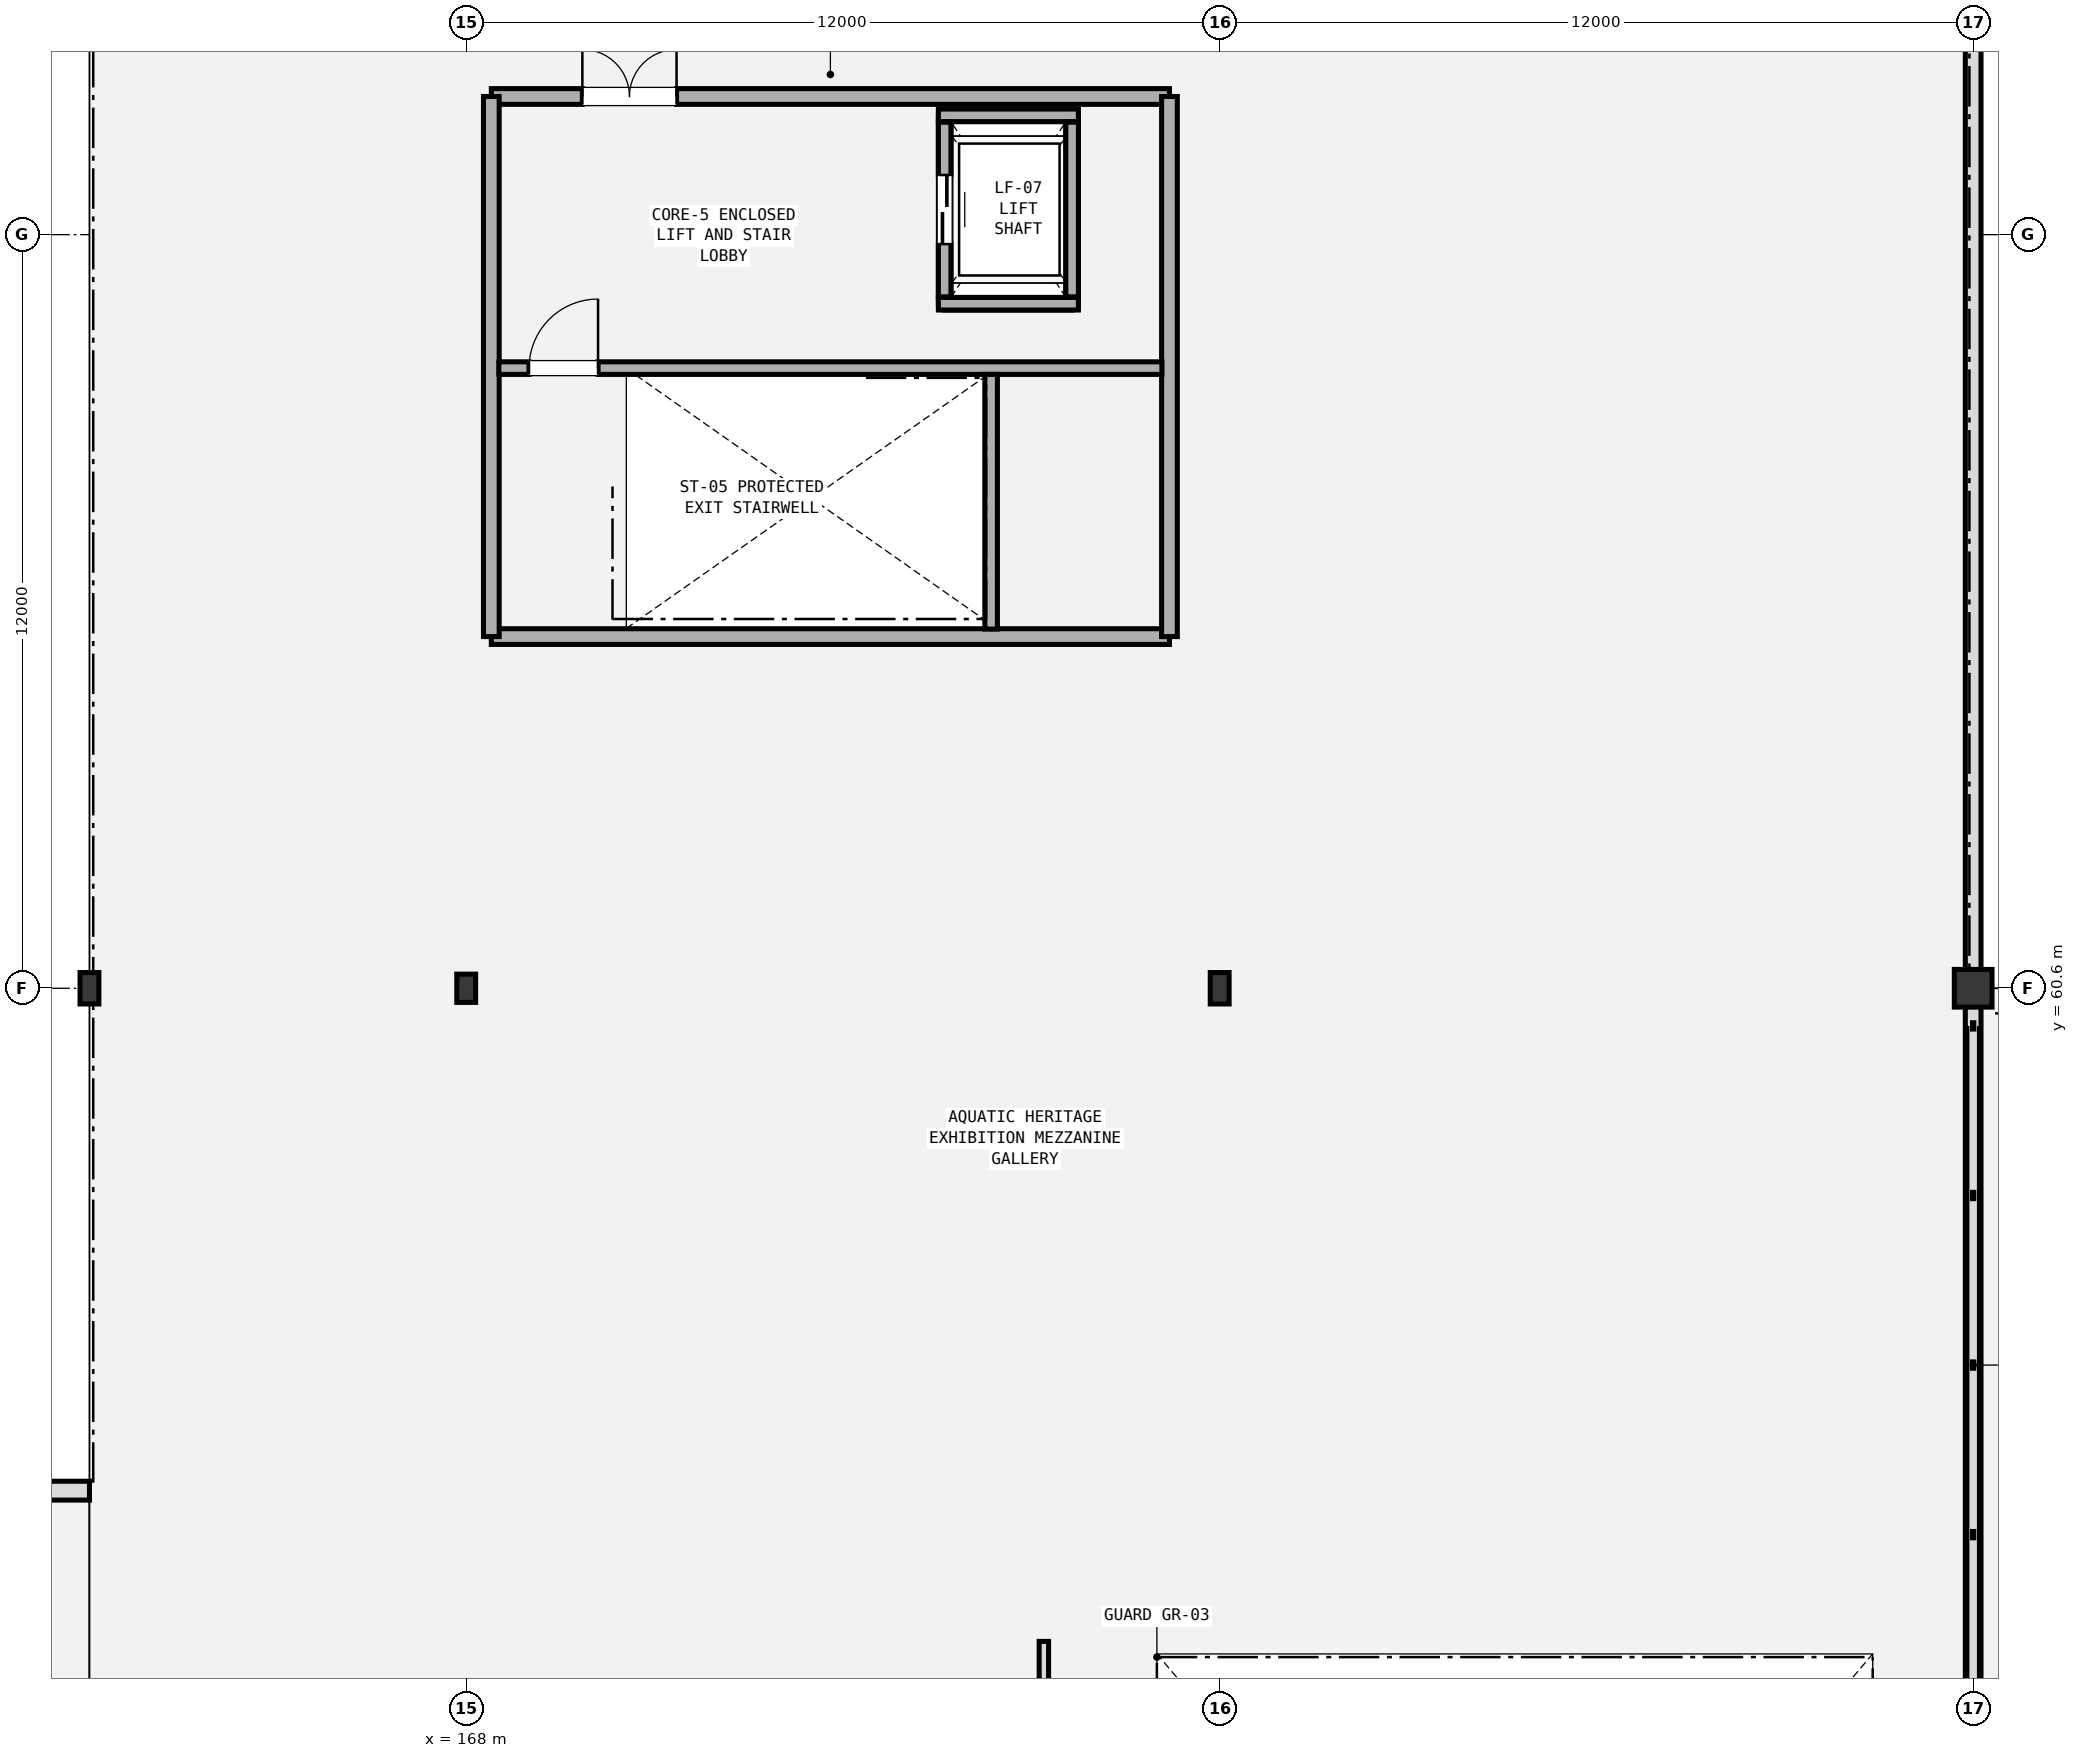
"""IFC4 building model, lengths in metres.
Left out: names, types, materials, properties, quantities, classifications, styles, units other than length and angle.
Written with IfcOpenShell. Run it as: python <this file> out.ifc"""

import sys

from ifc_helpers import new_model, si_unit, direction, frame, frame_2d, origin, origin_2d, place, context, subcontext, project, spatial, rectangle, i_section, extrude, element, fill, save


model = new_model("IFC4")
c1 = context("Model", 3, precision=1e-05, world=origin(), true_north=direction((0.0, 1.0)))
c2 = subcontext(c1, "Body", "Model", "MODEL_VIEW")
j1 = project(units=[si_unit("LENGTHUNIT", "METRE"), si_unit("PLANEANGLEUNIT", "RADIAN")], contexts=[c1])
p1 = place(None, origin())
s1 = spatial("IfcSite", under=j1, at=p1, CompositionType="ELEMENT")
p2 = place(p1, origin())
s2 = spatial("IfcBuilding", under=s1, at=p2, CompositionType="ELEMENT")
p3 = place(p2, frame((0.0, 0.0, 5.4)))
s3 = spatial("IfcBuildingStorey", under=s2, at=p3, CompositionType="ELEMENT", Elevation=5.4)
p4 = place(p3, frame((162.0, 60.6, 0.0), z_axis=(0.0, 0.0, 1.0), x_axis=(1.0, 0.0, 0.0)))
e1 = element("IfcColumn", 1, at=p4, inside=s3, PredefinedType="COLUMN", context=c2, shape_type="SweptSolid", body=[
    extrude(i_section(OverallWidth=0.3, OverallDepth=0.5, WebThickness=0.014, FlangeThickness=0.028, FilletRadius=0.027, at=origin_2d()), origin(), (0.0, 0.0, 1.0), 2.76),
])
p5 = place(p3, frame((168.0, 60.6, 0.0), z_axis=(0.0, 0.0, 1.0), x_axis=(1.0, 0.0, 0.0)))
e2 = element("IfcColumn", 2, at=p5, inside=s3, PredefinedType="COLUMN", context=c2, shape_type="SweptSolid", body=[
    extrude(i_section(OverallWidth=0.3, OverallDepth=0.45, WebThickness=0.014, FlangeThickness=0.026, FilletRadius=0.027, at=origin_2d()), origin(), (0.0, 0.0, 1.0), 2.76),
])
p6 = place(p3, frame((180.0, 60.6, 0.0), z_axis=(0.0, 0.0, 1.0), x_axis=(1.0, 0.0, 0.0)))
e3 = element("IfcColumn", 3, at=p6, inside=s3, PredefinedType="COLUMN", context=c2, shape_type="SweptSolid", body=[
    extrude(i_section(OverallWidth=0.3, OverallDepth=0.5, WebThickness=0.014, FlangeThickness=0.028, FilletRadius=0.027, at=origin_2d()), origin(), (0.0, 0.0, 1.0), 2.76),
])
p7 = place(p3, frame((192.0, 60.6, 0.0), z_axis=(0.0, 0.0, 1.0), x_axis=(1.0, 0.0, 0.0)))
e4 = element("IfcColumn", 4, at=p7, inside=s3, PredefinedType="COLUMN", context=c2, shape_type="SweptSolid", body=[
    extrude(rectangle(XDim=0.6, YDim=0.6, at=origin_2d()), origin(), (0.0, 0.0, 1.0), 2.76),
])
p8 = place(p3, frame((96.6, 52.6, 0.0), z_axis=(0.0, 0.0, 1.0), x_axis=(1.0, 0.0, 0.0)))
e5 = element("IfcWall", 5, at=p8, inside=s3, PredefinedType="SOLIDWALL", context=c2, shape_type="SweptSolid", body=[
    extrude(rectangle(XDim=65.4, YDim=0.3, at=frame_2d((32.7, 0.0))), origin(), (0.0, 0.0, 1.0), 3.53),
])
p9 = place(p8, frame((6.0, 0.0, 0.85)))
e6 = element("IfcOpeningElement", 6, at=p9, cuts=e5, PredefinedType="OPENING", context=c2, shape_type="SweptSolid", body=[
    extrude(rectangle(XDim=4.5, YDim=1.5, at=frame_2d((2.25, 0.75))), frame((0.0, 0.16, 0.0), z_axis=(0.0, -1.0, 0.0), x_axis=(1.0, 0.0, 0.0)), (0.0, 0.0, 1.0), 0.32),
])
p10 = place(p8, frame((18.0, 0.0, 0.85)))
e7 = element("IfcOpeningElement", 7, at=p10, cuts=e5, PredefinedType="OPENING", context=c2, shape_type="SweptSolid", body=[
    extrude(rectangle(XDim=4.0, YDim=1.5, at=frame_2d((2.0, 0.75))), frame((0.0, 0.16, 0.0), z_axis=(0.0, -1.0, 0.0), x_axis=(1.0, 0.0, 0.0)), (0.0, 0.0, 1.0), 0.32),
])
p11 = place(p8, frame((31.2, 0.0, 0.85)))
e8 = element("IfcOpeningElement", 8, at=p11, cuts=e5, PredefinedType="OPENING", context=c2, shape_type="SweptSolid", body=[
    extrude(rectangle(XDim=3.6, YDim=1.5, at=frame_2d((1.8, 0.75))), frame((0.0, 0.16, 0.0), z_axis=(0.0, -1.0, 0.0), x_axis=(1.0, 0.0, 0.0)), (0.0, 0.0, 1.0), 0.32),
])
p12 = place(p8, frame((43.6, 0.0, 0.85)))
e9 = element("IfcOpeningElement", 9, at=p12, cuts=e5, PredefinedType="OPENING", context=c2, shape_type="SweptSolid", body=[
    extrude(rectangle(XDim=3.2, YDim=1.5, at=frame_2d((1.6, 0.75))), frame((0.0, 0.16, 0.0), z_axis=(0.0, -1.0, 0.0), x_axis=(1.0, 0.0, 0.0)), (0.0, 0.0, 1.0), 0.32),
])
p13 = place(p3, frame((192.0, 24.6, 3.08), z_axis=(0.0, 0.0, 1.0), x_axis=(0.0, 1.0, 0.0)))
e10 = element("IfcWall", 10, at=p13, inside=s3, PredefinedType="PARAPET", context=c2, shape_type="SweptSolid", body=[
    extrude(rectangle(XDim=52.0, YDim=0.25, at=frame_2d((26.0, 0.0))), origin(), (0.0, 0.0, 1.0), 1.15),
])
p14 = place(p3, frame((168.4, 66.2, 0.0), z_axis=(0.0, 0.0, 1.0), x_axis=(1.0, 0.0, 0.0)))
e11 = element("IfcWall", 11, at=p14, inside=s3, PredefinedType="SHEAR", context=c2, shape_type="SweptSolid", body=[
    extrude(rectangle(XDim=10.8, YDim=0.25, at=frame_2d((5.4, 0.0))), origin(), (0.0, 0.0, 1.0), 2.76),
])
p15 = place(p3, frame((168.4, 74.8, 0.0), z_axis=(0.0, 0.0, 1.0), x_axis=(1.0, 0.0, 0.0)))
e12 = element("IfcWall", 12, at=p15, inside=s3, PredefinedType="SHEAR", context=c2, shape_type="SweptSolid", body=[
    extrude(rectangle(XDim=10.8, YDim=0.25, at=frame_2d((5.4, 0.0))), origin(), (0.0, 0.0, 1.0), 2.76),
])
p16 = place(p15, frame((1.45, 0.0, 0.0)))
e13 = element("IfcOpeningElement", 13, at=p16, cuts=e12, PredefinedType="OPENING", context=c2, shape_type="SweptSolid", body=[
    extrude(rectangle(XDim=1.5, YDim=2.2, at=frame_2d((0.75, 1.1))), frame((0.0, 0.135, 0.0), z_axis=(0.0, -1.0, 0.0), x_axis=(1.0, 0.0, 0.0)), (0.0, 0.0, 1.0), 0.27),
])
for number, where, z_axis, x_axis in (
    (14, (168.4, 66.2, 0.0), (0.0, 0.0, 1.0), (0.0, 1.0, 0.0)),
    (15, (179.2, 66.2, 0.0), (0.0, 0.0, 1.0), (0.0, 1.0, 0.0)),
):
    element("IfcWall", number, at=place(p3, frame(where, z_axis=z_axis, x_axis=x_axis)), inside=s3, PredefinedType="SHEAR", context=c2, shape_type="SweptSolid", body=[
        extrude(rectangle(XDim=8.6, YDim=0.25, at=frame_2d((4.3, 0.0))), origin(), (0.0, 0.0, 1.0), 2.76),
    ])
p17 = place(p3, frame((168.52, 70.475, 0.0), z_axis=(0.0, 0.0, 1.0), x_axis=(1.0, 0.0, 0.0)))
e16 = element("IfcWall", 16, at=p17, inside=s3, PredefinedType="SHEAR", context=c2, shape_type="SweptSolid", body=[
    extrude(rectangle(XDim=10.56, YDim=0.2, at=frame_2d((5.28, 0.0))), origin(), (0.0, 0.0, 1.0), 2.76),
])
p18 = place(p17, frame((0.48, 0.0, 0.0)))
e17 = element("IfcOpeningElement", 17, at=p18, cuts=e16, PredefinedType="OPENING", context=c2, shape_type="SweptSolid", body=[
    extrude(rectangle(XDim=1.1, YDim=2.2, at=frame_2d((0.55, 1.1))), frame((0.0, 0.11, 0.0), z_axis=(0.0, -1.0, 0.0), x_axis=(1.0, 0.0, 0.0)), (0.0, 0.0, 1.0), 0.22),
])
p19 = place(p3, frame((176.36, 66.32, 0.0), z_axis=(0.0, 0.0, 1.0), x_axis=(0.0, 1.0, 0.0)))
e18 = element("IfcWall", 18, at=p19, inside=s3, PredefinedType="SHEAR", context=c2, shape_type="SweptSolid", body=[
    extrude(rectangle(XDim=4.055, YDim=0.2, at=frame_2d((2.027, 0.0))), origin(), (0.0, 0.0, 1.0), 2.76),
])
p20 = place(p3, frame((175.62, 71.5, 0.0), z_axis=(0.0, 0.0, 1.0), x_axis=(0.0, 1.0, 0.0)))
e19 = element("IfcWall", 19, at=p20, inside=s3, PredefinedType="SHEAR", context=c2, shape_type="SweptSolid", body=[
    extrude(rectangle(XDim=3.0, YDim=0.2, at=frame_2d((1.5, 0.0))), origin(), (0.0, 0.0, 1.0), 2.76),
])
p21 = place(p20, frame((0.95, 0.0, 0.0)))
e20 = element("IfcOpeningElement", 20, at=p21, cuts=e19, PredefinedType="OPENING", context=c2, shape_type="SweptSolid", body=[
    extrude(rectangle(XDim=1.1, YDim=2.2, at=frame_2d((0.55, 1.1))), frame((0.0, 0.11, 0.0), z_axis=(0.0, -1.0, 0.0), x_axis=(1.0, 0.0, 0.0)), (0.0, 0.0, 1.0), 0.22),
])
p22 = place(p3, frame((177.65, 71.5, 0.0), z_axis=(0.0, 0.0, 1.0), x_axis=(0.0, 1.0, 0.0)))
e21 = element("IfcWall", 21, at=p22, inside=s3, PredefinedType="SHEAR", context=c2, shape_type="SweptSolid", body=[
    extrude(rectangle(XDim=3.0, YDim=0.2, at=frame_2d((1.5, 0.0))), origin(), (0.0, 0.0, 1.0), 2.76),
])
for number, where, z_axis, x_axis in (
    (22, (175.62, 71.5, 0.0), (0.0, 0.0, 1.0), (1.0, 0.0, 0.0)),
    (23, (175.62, 74.5, 0.0), (0.0, 0.0, 1.0), (1.0, 0.0, 0.0)),
):
    element("IfcWall", number, at=place(p3, frame(where, z_axis=z_axis, x_axis=x_axis)), inside=s3, PredefinedType="SHEAR", context=c2, shape_type="SweptSolid", body=[
        extrude(rectangle(XDim=2.03, YDim=0.2, at=frame_2d((1.015, 0.0))), origin(), (0.0, 0.0, 1.0), 2.76),
    ])
for number, where, z_axis, x_axis in (
    (24, (175.52, 71.5, 2.76), (0.0, 0.0, 1.0), (1.0, 0.0, 0.0)),
    (25, (175.52, 74.5, 2.76), (0.0, 0.0, 1.0), (1.0, 0.0, 0.0)),
):
    element("IfcWall", number, at=place(p3, frame(where, z_axis=z_axis, x_axis=x_axis)), inside=s3, PredefinedType="SHEAR", context=c2, shape_type="SweptSolid", body=[
        extrude(rectangle(XDim=2.23, YDim=0.2, at=frame_2d((1.115, 0.0))), origin(), (0.0, 0.0, 1.0), 1.1),
    ])
for number, where, z_axis, x_axis in (
    (26, (175.62, 71.61, 2.76), (0.0, 0.0, 1.0), (0.0, 1.0, 0.0)),
    (27, (177.65, 71.61, 2.76), (0.0, 0.0, 1.0), (0.0, 1.0, 0.0)),
):
    element("IfcWall", number, at=place(p3, frame(where, z_axis=z_axis, x_axis=x_axis)), inside=s3, PredefinedType="SHEAR", context=c2, shape_type="SweptSolid", body=[
        extrude(rectangle(XDim=2.78, YDim=0.2, at=frame_2d((1.39, 0.0))), origin(), (0.0, 0.0, 1.0), 1.1),
    ])
p23 = place(p3, frame((177.2, 36.6, 0.0), z_axis=(0.0, 0.0, 1.0), x_axis=(0.0, 1.0, 0.0)))
e28 = element("IfcWall", 28, at=p23, inside=s3, PredefinedType="PARTITIONING", context=c2, shape_type="SweptSolid", body=[
    extrude(rectangle(XDim=13.6, YDim=0.15, at=frame_2d((6.8, 0.0))), origin(), (0.0, 0.0, 1.0), 2.6),
])
p24 = place(p23, frame((6.0, 0.0, 0.0)))
e29 = element("IfcOpeningElement", 29, at=p24, cuts=e28, PredefinedType="OPENING", context=c2, shape_type="SweptSolid", body=[
    extrude(rectangle(XDim=1.6, YDim=2.2, at=frame_2d((0.8, 1.1))), frame((0.0, 0.085, 0.0), z_axis=(0.0, -1.0, 0.0), x_axis=(1.0, 0.0, 0.0)), (0.0, 0.0, 1.0), 0.17),
])
p25 = place(p16, origin())
e30 = element("IfcDoor", 30, at=p25, inside=s3, OperationType="DOUBLE_DOOR_SINGLE_SWING", PredefinedType="DOOR", context=c2, shape_type="SweptSolid", body=[
    extrude(rectangle(XDim=1.5, YDim=2.2, at=frame_2d((0.75, 1.1))), frame((0.0, 0.025, 0.0), z_axis=(0.0, -1.0, 0.0), x_axis=(1.0, 0.0, 0.0)), (0.0, 0.0, 1.0), 0.05),
])
fill(e13, e30)
p26 = place(p18, origin())
e31 = element("IfcDoor", 31, at=p26, inside=s3, OperationType="SINGLE_SWING_RIGHT", PredefinedType="DOOR", context=c2, shape_type="SweptSolid", body=[
    extrude(rectangle(XDim=1.1, YDim=2.2, at=frame_2d((0.55, 1.1))), frame((0.0, 0.025, 0.0), z_axis=(0.0, -1.0, 0.0), x_axis=(1.0, 0.0, 0.0)), (0.0, 0.0, 1.0), 0.05),
])
fill(e17, e31)
p27 = place(p21, origin())
e32 = element("IfcDoor", 32, at=p27, inside=s3, OperationType="DOUBLE_DOOR_SLIDING", PredefinedType="DOOR", context=c2, shape_type="SweptSolid", body=[
    extrude(rectangle(XDim=1.1, YDim=2.2, at=frame_2d((0.55, 1.1))), frame((0.0, 0.025, 0.0), z_axis=(0.0, -1.0, 0.0), x_axis=(1.0, 0.0, 0.0)), (0.0, 0.0, 1.0), 0.05),
])
fill(e20, e32)
save(model, sys.argv[1])
